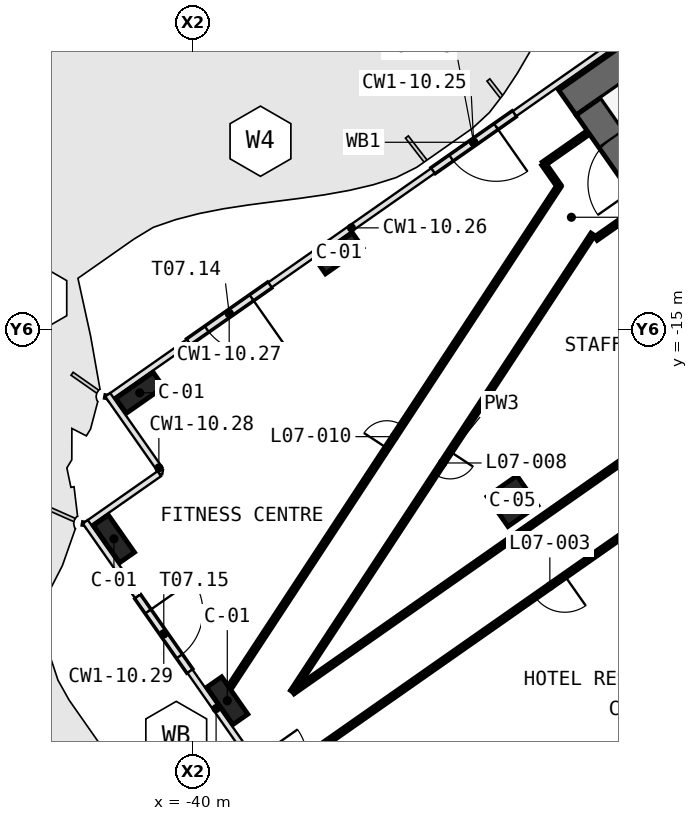
"""IFC4 building model, lengths in metres.
Left out: names, types, materials, properties, quantities, classifications, styles, units other than length and angle.
Written with IfcOpenShell. Run it as: python <this file> out.ifc"""

import sys

from ifc_helpers import new_model, si_unit, direction, frame, frame_2d, origin, origin_2d, place, context, subcontext, project, spatial, polyline, rectangle, outline, extrude, element, fill, save


model = new_model("IFC4")
c1 = context("Model", 3, precision=1e-05, world=origin(), true_north=direction((0.0, 1.0)))
c2 = subcontext(c1, "Body", "Model", "MODEL_VIEW")
j1 = project(units=[si_unit("LENGTHUNIT", "METRE"), si_unit("PLANEANGLEUNIT", "RADIAN")], contexts=[c1])
p1 = place(None, origin())
s1 = spatial("IfcSite", under=j1, at=p1, CompositionType="ELEMENT")
p2 = place(p1, origin())
s2 = spatial("IfcBuilding", under=s1, at=p2, CompositionType="ELEMENT")
p3 = place(p2, frame((0.0, 0.0, 48.5)))
s3 = spatial("IfcBuildingStorey", under=s2, at=p3, CompositionType="ELEMENT", Elevation=48.5)
p4 = place(p3, frame((0.037, 11.867, 0.0), z_axis=(0.0, 0.0, 1.0), x_axis=(-0.819155306259, -0.573571777746, 0.0)))
e1 = element("IfcWall", 1, at=p4, inside=s3, PredefinedType="SHEAR", context=c2, shape_type="SweptSolid", body=[
    extrude(outline(polyline([(33.837, 0.5), (0.7, 0.5), (0.0, -0.5), (33.837, -0.5), (33.837, 0.5)])), origin(), (0.0, 0.0, 1.0), 6.0),
])
p5 = place(p3, frame((-21.708, -15.2, 0.0), z_axis=(0.0, 0.0, 1.0), x_axis=(-0.573576324356, 0.819152122709, 0.0)))
e2 = element("IfcWall", 2, at=p5, inside=s3, PredefinedType="SHEAR", context=c2, shape_type="SweptSolid", body=[
    extrude(outline(polyline([(0.0, 0.5), (0.0, -0.5), (9.2, -0.5), (9.2, 0.5), (0.0, 0.5)])), origin(), (0.0, 0.0, 1.0), 6.0),
])
p6 = place(p5, frame((6.1, 0.0, 0.0)))
e3 = element("IfcOpeningElement", 3, at=p6, cuts=e2, PredefinedType="OPENING", context=c2, shape_type="SweptSolid", body=[
    extrude(rectangle(XDim=1.8, YDim=2.1, at=frame_2d((0.9, 1.05))), frame((0.0, 0.51, 0.0), z_axis=(0.0, -1.0, 0.0), x_axis=(1.0, 0.0, 0.0)), (0.0, 0.0, 1.0), 1.02),
])
p7 = place(p5, frame((1.9, 0.0, 0.0)))
e4 = element("IfcOpeningElement", 4, at=p7, cuts=e2, PredefinedType="OPENING", context=c2, shape_type="SweptSolid", body=[
    extrude(rectangle(XDim=1.8, YDim=2.1, at=frame_2d((0.9, 1.05))), frame((0.0, 0.51, 0.0), z_axis=(0.0, -1.0, 0.0), x_axis=(1.0, 0.0, 0.0)), (0.0, 0.0, 1.0), 1.02),
])
for number, where, z_axis, x_axis in (
    (5, (-35.197, -12.498, 0.0), (0.0, 0.0, 1.0), (-0.819, -0.574, 0.0)),
    (6, (-41.75, -17.087, 0.0), (0.0, 0.0, 1.0), (-0.819, -0.574, 0.0)),
    (7, (-38.869, -27.216, 0.0), (0.0, 0.0, 1.0), (-0.574, 0.819, 0.0)),
    (8, (-42.597, -21.892, 0.0), (0.0, 0.0, 1.0), (-0.574, 0.819, 0.0)),
):
    element("IfcColumn", number, at=place(p3, frame(where, z_axis=z_axis, x_axis=x_axis)), inside=s3, PredefinedType="COLUMN", context=c2, shape_type="SweptSolid", body=[
        extrude(rectangle(XDim=1.5, YDim=0.6, at=origin_2d()), origin(), (0.0, 0.0, 1.0), 6.0),
    ])
p8 = place(p3, frame((-29.49, -20.649, 0.0), z_axis=(0.0, 0.0, 1.0), x_axis=(-0.819152044289, -0.573576436351, 0.0)))
e9 = element("IfcColumn", 9, at=p8, inside=s3, PredefinedType="COLUMN", context=c2, shape_type="SweptSolid", body=[
    extrude(rectangle(XDim=1.2, YDim=1.2, at=origin_2d()), origin(), (0.0, 0.0, 1.0), 6.0),
])
p9 = place(p3, frame((-29.45, -7.925, 0.0), z_axis=(0.0, 0.0, 1.0), x_axis=(-0.819156924044, -0.573569467276, 0.0)))
e10 = element("IfcWall", 10, at=p9, inside=s3, PredefinedType="SOLIDWALL", context=c2, shape_type="SweptSolid", body=[
    extrude(rectangle(XDim=3.212, YDim=0.2, at=frame_2d((1.606, 0.0))), origin(), (0.0, 0.0, 1.0), 5.72),
])
p10 = place(p9, frame((0.706, 0.0, 0.0)))
e11 = element("IfcOpeningElement", 11, at=p10, cuts=e10, PredefinedType="OPENING", context=c2, shape_type="SweptSolid", body=[
    extrude(rectangle(XDim=1.8, YDim=2.4, at=frame_2d((0.9, 1.2))), frame((0.0, 0.11, 0.0), z_axis=(0.0, -1.0, 0.0), x_axis=(1.0, 0.0, 0.0)), (0.0, 0.0, 1.0), 0.22),
])
p11 = place(p3, frame((-37.491, -13.555, 0.0), z_axis=(0.0, 0.0, 1.0), x_axis=(-0.819156924044, -0.573569467276, 0.0)))
e12 = element("IfcWall", 12, at=p11, inside=s3, PredefinedType="SOLIDWALL", context=c2, shape_type="SweptSolid", body=[
    extrude(rectangle(XDim=3.212, YDim=0.2, at=frame_2d((1.606, 0.0))), origin(), (0.0, 0.0, 1.0), 5.72),
])
p12 = place(p11, frame((0.706, 0.0, 0.0)))
e13 = element("IfcOpeningElement", 13, at=p12, cuts=e12, PredefinedType="OPENING", context=c2, shape_type="SweptSolid", body=[
    extrude(rectangle(XDim=1.8, YDim=2.4, at=frame_2d((0.9, 1.2))), frame((0.0, 0.11, 0.0), z_axis=(0.0, -1.0, 0.0), x_axis=(1.0, 0.0, 0.0)), (0.0, 0.0, 1.0), 0.22),
])
p13 = place(p3, frame((-41.801, -23.813, 0.0), z_axis=(0.0, 0.0, 1.0), x_axis=(0.573584953252, -0.819146080625, 0.0)))
e14 = element("IfcWall", 14, at=p13, inside=s3, PredefinedType="SOLIDWALL", context=c2, shape_type="SweptSolid", body=[
    extrude(rectangle(XDim=2.94, YDim=0.2, at=frame_2d((1.47, 0.0))), origin(), (0.0, 0.0, 1.0), 5.72),
])
p14 = place(p13, frame((0.57, 0.0, 0.0)))
e15 = element("IfcOpeningElement", 15, at=p14, cuts=e14, PredefinedType="OPENING", context=c2, shape_type="SweptSolid", body=[
    extrude(rectangle(XDim=1.8, YDim=2.4, at=frame_2d((0.9, 1.2))), frame((0.0, 0.11, 0.0), z_axis=(0.0, -1.0, 0.0), x_axis=(1.0, 0.0, 0.0)), (0.0, 0.0, 1.0), 0.22),
])
p15 = place(p3, frame((-20.395, -17.943, 0.0), z_axis=(0.0, 0.0, 1.0), x_axis=(-0.819147689755, -0.573582655221, 0.0)))
e16 = element("IfcWall", 16, at=p15, inside=s3, PredefinedType="PARTITIONING", context=c2, shape_type="SweptSolid", body=[
    extrude(rectangle(XDim=19.202, YDim=0.15, at=frame_2d((9.601, 0.0))), origin(), (0.0, 0.0, 1.0), 5.0),
])
p16 = place(p15, frame((9.001, 0.0, 0.0)))
e17 = element("IfcOpeningElement", 17, at=p16, cuts=e16, PredefinedType="OPENING", context=c2, shape_type="SweptSolid", body=[
    extrude(rectangle(XDim=1.2, YDim=2.4, at=frame_2d((0.6, 1.2))), frame((0.0, 0.085, 0.0), z_axis=(0.0, -1.0, 0.0), x_axis=(1.0, 0.0, 0.0)), (0.0, 0.0, 1.0), 0.17),
])
p17 = place(p3, frame((-36.717, -26.93, 0.0), z_axis=(0.0, 0.0, 1.0), x_axis=(0.819150266993, 0.573578974585, 0.0)))
e18 = element("IfcWall", 18, at=p17, inside=s3, PredefinedType="PARTITIONING", context=c2, shape_type="SweptSolid", body=[
    extrude(rectangle(XDim=18.403, YDim=0.15, at=frame_2d((9.202, 0.0))), origin(), (0.0, 0.0, 1.0), 5.0),
])
p18 = place(p3, frame((-28.467, -9.556, 0.0), z_axis=(0.0, 0.0, 1.0), x_axis=(0.819109000826, 0.573637903879, 0.0)))
e19 = element("IfcWall", 19, at=p18, inside=s3, PredefinedType="PARTITIONING", context=c2, shape_type="SweptSolid", body=[
    extrude(rectangle(XDim=1.68, YDim=0.15, at=frame_2d((0.84, 0.0))), origin(), (0.0, 0.0, 1.0), 5.72),
])
p19 = place(p3, frame((-38.787, -26.775, 0.0), z_axis=(0.0, 0.0, 1.0), x_axis=(0.548981310193, 0.835834625424, 0.0)))
e20 = element("IfcWall", 20, at=p19, inside=s3, PredefinedType="PARTITIONING", context=c2, shape_type="SweptSolid", body=[
    extrude(rectangle(XDim=19.729, YDim=0.15, at=frame_2d((9.864, 0.0))), origin(), (0.0, 0.0, 1.0), 5.0),
])
p20 = place(p19, frame((9.414, 0.0, 0.0)))
e21 = element("IfcOpeningElement", 21, at=p20, cuts=e20, PredefinedType="OPENING", context=c2, shape_type="SweptSolid", body=[
    extrude(rectangle(XDim=0.9, YDim=2.1, at=frame_2d((0.45, 1.05))), frame((0.0, 0.085, 0.0), z_axis=(0.0, -1.0, 0.0), x_axis=(1.0, 0.0, 0.0)), (0.0, 0.0, 1.0), 0.17),
])
p21 = place(p3, frame((-27.957, -10.285, 0.0), z_axis=(0.0, 0.0, 1.0), x_axis=(-0.573370236326, 0.819296388431, 0.0)))
e22 = element("IfcWall", 22, at=p21, inside=s3, PredefinedType="PARTITIONING", context=c2, shape_type="SweptSolid", body=[
    extrude(rectangle(XDim=0.889, YDim=0.15, at=frame_2d((0.445, 0.0))), origin(), (0.0, 0.0, 1.0), 5.72),
])
p22 = place(p3, frame((-25.37, -11.05, 0.0), z_axis=(0.0, 0.0, 1.0), x_axis=(-0.819109000826, -0.573637903879, 0.0)))
e23 = element("IfcWall", 23, at=p22, inside=s3, PredefinedType="PARTITIONING", context=c2, shape_type="SweptSolid", body=[
    extrude(rectangle(XDim=1.68, YDim=0.15, at=frame_2d((0.84, 0.0))), origin(), (0.0, 0.0, 1.0), 5.72),
])
p23 = place(p3, frame((-26.845, -11.872, 0.0), z_axis=(0.0, 0.0, 1.0), x_axis=(-0.54898817212, -0.835830118429, 0.0)))
e24 = element("IfcWall", 24, at=p23, inside=s3, PredefinedType="PARTITIONING", context=c2, shape_type="SweptSolid", body=[
    extrude(rectangle(XDim=18.002, YDim=0.15, at=frame_2d((9.001, 0.0))), origin(), (0.0, 0.0, 1.0), 5.0),
])
p24 = place(p23, frame((8.551, 0.0, 0.0)))
e25 = element("IfcOpeningElement", 25, at=p24, cuts=e24, PredefinedType="OPENING", context=c2, shape_type="SweptSolid", body=[
    extrude(rectangle(XDim=0.9, YDim=2.1, at=frame_2d((0.45, 1.05))), frame((0.0, 0.085, 0.0), z_axis=(0.0, -1.0, 0.0), x_axis=(1.0, 0.0, 0.0)), (0.0, 0.0, 1.0), 0.17),
])
p25 = place(p6, origin())
e26 = element("IfcDoor", 26, at=p25, inside=s3, OperationType="DOUBLE_DOOR_SINGLE_SWING", PredefinedType="DOOR", context=c2, shape_type="SweptSolid", body=[
    extrude(rectangle(XDim=1.8, YDim=2.1, at=frame_2d((0.9, 1.05))), frame((0.0, 0.025, 0.0), z_axis=(0.0, -1.0, 0.0), x_axis=(1.0, 0.0, 0.0)), (0.0, 0.0, 1.0), 0.05),
])
fill(e3, e26)
p26 = place(p10, origin())
e27 = element("IfcDoor", 27, at=p26, inside=s3, OperationType="DOUBLE_DOOR_DOUBLE_SWING", PredefinedType="DOOR", context=c2, shape_type="SweptSolid", body=[
    extrude(rectangle(XDim=1.8, YDim=2.4, at=frame_2d((0.9, 1.2))), frame((0.0, 0.025, 0.0), z_axis=(0.0, -1.0, 0.0), x_axis=(1.0, 0.0, 0.0)), (0.0, 0.0, 1.0), 0.05),
])
fill(e11, e27)
p27 = place(p12, origin())
e28 = element("IfcDoor", 28, at=p27, inside=s3, OperationType="DOUBLE_DOOR_DOUBLE_SWING", PredefinedType="DOOR", context=c2, shape_type="SweptSolid", body=[
    extrude(rectangle(XDim=1.8, YDim=2.4, at=frame_2d((0.9, 1.2))), frame((0.0, 0.025, 0.0), z_axis=(0.0, -1.0, 0.0), x_axis=(1.0, 0.0, 0.0)), (0.0, 0.0, 1.0), 0.05),
])
fill(e13, e28)
p28 = place(p14, origin())
e29 = element("IfcDoor", 29, at=p28, inside=s3, OperationType="DOUBLE_DOOR_DOUBLE_SWING", PredefinedType="DOOR", context=c2, shape_type="SweptSolid", body=[
    extrude(rectangle(XDim=1.8, YDim=2.4, at=frame_2d((0.9, 1.2))), frame((0.0, 0.025, 0.0), z_axis=(0.0, -1.0, 0.0), x_axis=(1.0, 0.0, 0.0)), (0.0, 0.0, 1.0), 0.05),
])
fill(e15, e29)
p29 = place(p16, origin())
e30 = element("IfcDoor", 30, at=p29, inside=s3, OperationType="DOUBLE_DOOR_SINGLE_SWING", PredefinedType="DOOR", context=c2, shape_type="SweptSolid", body=[
    extrude(rectangle(XDim=1.2, YDim=2.4, at=frame_2d((0.6, 1.2))), frame((0.0, 0.025, 0.0), z_axis=(0.0, -1.0, 0.0), x_axis=(1.0, 0.0, 0.0)), (0.0, 0.0, 1.0), 0.05),
])
fill(e17, e30)
p30 = place(p24, origin())
e31 = element("IfcDoor", 31, at=p30, inside=s3, OperationType="SINGLE_SWING_RIGHT", PredefinedType="DOOR", context=c2, shape_type="SweptSolid", body=[
    extrude(rectangle(XDim=0.9, YDim=2.1, at=frame_2d((0.45, 1.05))), frame((0.0, 0.025, 0.0), z_axis=(0.0, -1.0, 0.0), x_axis=(1.0, 0.0, 0.0)), (0.0, 0.0, 1.0), 0.05),
])
fill(e25, e31)
p31 = place(p20, origin())
e32 = element("IfcDoor", 32, at=p31, inside=s3, OperationType="SINGLE_SWING_LEFT", PredefinedType="DOOR", context=c2, shape_type="SweptSolid", body=[
    extrude(rectangle(XDim=0.9, YDim=2.1, at=frame_2d((0.45, 1.05))), frame((0.0, 0.025, 0.0), z_axis=(0.0, -1.0, 0.0), x_axis=(1.0, 0.0, 0.0)), (0.0, 0.0, 1.0), 0.05),
])
fill(e21, e32)
save(model, sys.argv[1])
